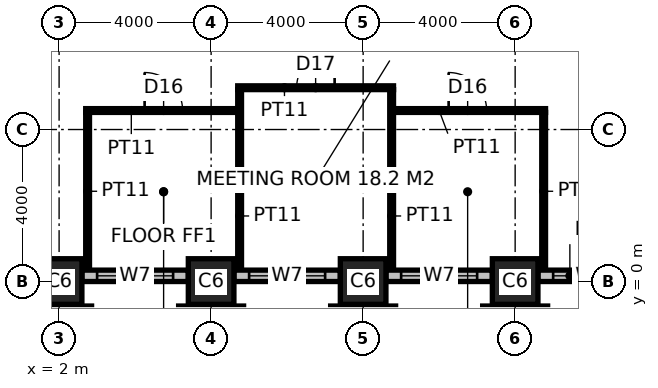
"""IFC4 building model, lengths in metres.
Left out: names, types, materials, properties, quantities, classifications, styles, units other than length and angle.
Written with IfcOpenShell. Run it as: python <this file> out.ifc"""

import sys

from ifc_helpers import new_model, si_unit, direction, frame, frame_2d, origin, origin_2d, place, context, subcontext, project, spatial, rectangle, hollow_rectangle, extrude, element, fill, save


model = new_model("IFC4")
c1 = context("Model", 3, precision=1e-05, world=origin(), true_north=direction((0.0, 1.0)))
c2 = subcontext(c1, "Body", "Model", "MODEL_VIEW")
j1 = project(units=[si_unit("LENGTHUNIT", "METRE"), si_unit("PLANEANGLEUNIT", "RADIAN")], contexts=[c1])
p1 = place(None, origin())
s1 = spatial("IfcSite", under=j1, at=p1, CompositionType="ELEMENT")
p2 = place(p1, origin())
s2 = spatial("IfcBuilding", under=s1, at=p2, CompositionType="ELEMENT")
p3 = place(p2, frame((0.0, 0.0, 67.0)))
s3 = spatial("IfcBuildingStorey", under=s2, at=p3, CompositionType="ELEMENT", Elevation=67.0)
for number, where, z_axis, x_axis in (
    (1, (2.0, 0.0, 0.0), (0.0, 0.0, 1.0), (1.0, 0.0, 0.0)),
    (2, (6.0, 0.0, 0.0), (0.0, 0.0, 1.0), (1.0, 0.0, 0.0)),
    (3, (10.0, 0.0, 0.0), (0.0, 0.0, 1.0), (1.0, 0.0, 0.0)),
    (4, (14.0, 0.0, 0.0), (0.0, 0.0, 1.0), (1.0, 0.0, 0.0)),
):
    element("IfcColumn", number, at=place(p3, frame(where, z_axis=z_axis, x_axis=x_axis)), inside=s3, PredefinedType="COLUMN", context=c2, shape_type="SweptSolid", body=[
        extrude(hollow_rectangle(XDim=1.2, YDim=1.2, WallThickness=0.125, at=origin_2d()), origin(), (0.0, 0.0, 1.0), 4.0),
    ])
p4 = place(p3, frame((2.7, 4.5, 0.0), z_axis=(0.0, 0.0, 1.0), x_axis=(1.0, 0.0, 0.0)))
e5 = element("IfcWall", 5, at=p4, inside=s3, PredefinedType="PARTITIONING", context=c2, shape_type="SweptSolid", body=[
    extrude(rectangle(XDim=4.0, YDim=0.1, at=frame_2d((2.0, 0.0))), origin(), (0.0, 0.0, 1.0), 3.85),
])
p5 = place(p4, frame((1.55, 0.0, 0.0)))
e6 = element("IfcOpeningElement", 6, at=p5, cuts=e5, PredefinedType="OPENING", context=c2, shape_type="SweptSolid", body=[
    extrude(rectangle(XDim=1.0, YDim=2.2, at=frame_2d((0.5, 1.1))), frame((0.0, 0.06, 0.0), z_axis=(0.0, -1.0, 0.0), x_axis=(1.0, 0.0, 0.0)), (0.0, 0.0, 1.0), 0.12),
])
p6 = place(p3, frame((10.8, 4.5, 0.0), z_axis=(0.0, 0.0, 1.0), x_axis=(1.0, 0.0, 0.0)))
e7 = element("IfcWall", 7, at=p6, inside=s3, PredefinedType="PARTITIONING", context=c2, shape_type="SweptSolid", body=[
    extrude(rectangle(XDim=4.0, YDim=0.1, at=frame_2d((2.0, 0.0))), origin(), (0.0, 0.0, 1.0), 3.85),
])
p7 = place(p6, frame((1.45, 0.0, 0.0)))
e8 = element("IfcOpeningElement", 8, at=p7, cuts=e7, PredefinedType="OPENING", context=c2, shape_type="SweptSolid", body=[
    extrude(rectangle(XDim=1.0, YDim=2.2, at=frame_2d((0.5, 1.1))), frame((0.0, 0.06, 0.0), z_axis=(0.0, -1.0, 0.0), x_axis=(1.0, 0.0, 0.0)), (0.0, 0.0, 1.0), 0.12),
])
p8 = place(p3, frame((6.7, 5.1, 0.0), z_axis=(0.0, 0.0, 1.0), x_axis=(1.0, 0.0, 0.0)))
e9 = element("IfcWall", 9, at=p8, inside=s3, PredefinedType="PARTITIONING", context=c2, shape_type="SweptSolid", body=[
    extrude(rectangle(XDim=4.1, YDim=0.1, at=frame_2d((2.05, 0.0))), origin(), (0.0, 0.0, 1.0), 3.85),
])
p9 = place(p8, frame((1.55, 0.0, 0.0)))
e10 = element("IfcOpeningElement", 10, at=p9, cuts=e9, PredefinedType="OPENING", context=c2, shape_type="SweptSolid", body=[
    extrude(rectangle(XDim=1.0, YDim=2.2, at=frame_2d((0.5, 1.1))), frame((0.0, 0.06, 0.0), z_axis=(0.0, -1.0, 0.0), x_axis=(1.0, 0.0, 0.0)), (0.0, 0.0, 1.0), 0.12),
])
p10 = place(p3, frame((2.75, 0.3, 0.0), z_axis=(0.0, 0.0, 1.0), x_axis=(0.0, 1.0, 0.0)))
e11 = element("IfcWall", 11, at=p10, inside=s3, PredefinedType="PARTITIONING", context=c2, shape_type="SweptSolid", body=[
    extrude(rectangle(XDim=4.15, YDim=0.1, at=frame_2d((2.075, 0.0))), origin(), (0.0, 0.0, 1.0), 3.85),
])
for number, where, z_axis, x_axis in (
    (12, (6.75, 0.3, 0.0), (0.0, 0.0, 1.0), (0.0, 1.0, 0.0)),
    (13, (10.75, 0.3, 0.0), (0.0, 0.0, 1.0), (0.0, 1.0, 0.0)),
):
    element("IfcWall", number, at=place(p3, frame(where, z_axis=z_axis, x_axis=x_axis)), inside=s3, PredefinedType="PARTITIONING", context=c2, shape_type="SweptSolid", body=[
        extrude(rectangle(XDim=4.75, YDim=0.1, at=frame_2d((2.375, 0.0))), origin(), (0.0, 0.0, 1.0), 3.85),
    ])
p11 = place(p3, frame((14.75, 0.3, 0.0), z_axis=(0.0, 0.0, 1.0), x_axis=(0.0, 1.0, 0.0)))
e14 = element("IfcWall", 14, at=p11, inside=s3, PredefinedType="PARTITIONING", context=c2, shape_type="SweptSolid", body=[
    extrude(rectangle(XDim=4.15, YDim=0.1, at=frame_2d((2.075, 0.0))), origin(), (0.0, 0.0, 1.0), 3.85),
])
p12 = place(p3, frame((2.6, 0.15, 0.0), z_axis=(0.0, 0.0, 1.0), x_axis=(1.0, 0.0, 0.0)))
e15 = element("IfcWall", 15, at=p12, inside=s3, PredefinedType="ELEMENTEDWALL", context=c2, shape_type="SweptSolid", body=[
    extrude(rectangle(XDim=2.8, YDim=0.3, at=frame_2d((1.4, 0.0))), origin(), (0.0, 0.0, 1.0), 2.65),
])
p13 = place(p12, frame((0.4, 0.0, 0.8)))
e16 = element("IfcOpeningElement", 16, at=p13, cuts=e15, PredefinedType="OPENING", context=c2, shape_type="SweptSolid", body=[
    extrude(rectangle(XDim=2.0, YDim=1.8, at=frame_2d((1.0, 0.9))), frame((0.0, 0.16, 0.0), z_axis=(0.0, -1.0, 0.0), x_axis=(1.0, 0.0, 0.0)), (0.0, 0.0, 1.0), 0.32),
])
p14 = place(p3, frame((6.6, 0.15, 0.0), z_axis=(0.0, 0.0, 1.0), x_axis=(1.0, 0.0, 0.0)))
e17 = element("IfcWall", 17, at=p14, inside=s3, PredefinedType="ELEMENTEDWALL", context=c2, shape_type="SweptSolid", body=[
    extrude(rectangle(XDim=2.8, YDim=0.3, at=frame_2d((1.4, 0.0))), origin(), (0.0, 0.0, 1.0), 2.65),
])
p15 = place(p14, frame((0.4, 0.0, 0.8)))
e18 = element("IfcOpeningElement", 18, at=p15, cuts=e17, PredefinedType="OPENING", context=c2, shape_type="SweptSolid", body=[
    extrude(rectangle(XDim=2.0, YDim=1.8, at=frame_2d((1.0, 0.9))), frame((0.0, 0.16, 0.0), z_axis=(0.0, -1.0, 0.0), x_axis=(1.0, 0.0, 0.0)), (0.0, 0.0, 1.0), 0.32),
])
p16 = place(p3, frame((10.6, 0.15, 0.0), z_axis=(0.0, 0.0, 1.0), x_axis=(1.0, 0.0, 0.0)))
e19 = element("IfcWall", 19, at=p16, inside=s3, PredefinedType="ELEMENTEDWALL", context=c2, shape_type="SweptSolid", body=[
    extrude(rectangle(XDim=2.8, YDim=0.3, at=frame_2d((1.4, 0.0))), origin(), (0.0, 0.0, 1.0), 2.95),
])
p17 = place(p16, frame((0.4, 0.0, 0.8)))
e20 = element("IfcOpeningElement", 20, at=p17, cuts=e19, PredefinedType="OPENING", context=c2, shape_type="SweptSolid", body=[
    extrude(rectangle(XDim=2.0, YDim=1.8, at=frame_2d((1.0, 0.9))), frame((0.0, 0.16, 0.0), z_axis=(0.0, -1.0, 0.0), x_axis=(1.0, 0.0, 0.0)), (0.0, 0.0, 1.0), 0.32),
])
p18 = place(p3, frame((14.6, 0.15, 0.0), z_axis=(0.0, 0.0, 1.0), x_axis=(1.0, 0.0, 0.0)))
e21 = element("IfcWall", 21, at=p18, inside=s3, PredefinedType="ELEMENTEDWALL", context=c2, shape_type="SweptSolid", body=[
    extrude(rectangle(XDim=2.8, YDim=0.3, at=frame_2d((1.4, 0.0))), origin(), (0.0, 0.0, 1.0), 2.95),
])
p19 = place(p18, frame((0.4, 0.0, 0.8)))
e22 = element("IfcOpeningElement", 22, at=p19, cuts=e21, PredefinedType="OPENING", context=c2, shape_type="SweptSolid", body=[
    extrude(rectangle(XDim=2.0, YDim=1.8, at=frame_2d((1.0, 0.9))), frame((0.0, 0.16, 0.0), z_axis=(0.0, -1.0, 0.0), x_axis=(1.0, 0.0, 0.0)), (0.0, 0.0, 1.0), 0.32),
])
p20 = place(p5, origin())
e23 = element("IfcDoor", 23, at=p20, inside=s3, OperationType="SINGLE_SWING_LEFT", PredefinedType="DOOR", context=c2, shape_type="SweptSolid", body=[
    extrude(rectangle(XDim=1.0, YDim=2.2, at=frame_2d((0.5, 1.1))), frame((0.0, 0.025, 0.0), z_axis=(0.0, -1.0, 0.0), x_axis=(1.0, 0.0, 0.0)), (0.0, 0.0, 1.0), 0.05),
])
fill(e6, e23)
p21 = place(p9, origin())
e24 = element("IfcDoor", 24, at=p21, inside=s3, OperationType="SINGLE_SWING_RIGHT", PredefinedType="DOOR", context=c2, shape_type="SweptSolid", body=[
    extrude(rectangle(XDim=1.0, YDim=2.2, at=frame_2d((0.5, 1.1))), frame((0.0, 0.025, 0.0), z_axis=(0.0, -1.0, 0.0), x_axis=(1.0, 0.0, 0.0)), (0.0, 0.0, 1.0), 0.05),
])
fill(e10, e24)
p22 = place(p7, origin())
e25 = element("IfcDoor", 25, at=p22, inside=s3, OperationType="SINGLE_SWING_LEFT", PredefinedType="DOOR", context=c2, shape_type="SweptSolid", body=[
    extrude(rectangle(XDim=1.0, YDim=2.2, at=frame_2d((0.5, 1.1))), frame((0.0, 0.025, 0.0), z_axis=(0.0, -1.0, 0.0), x_axis=(1.0, 0.0, 0.0)), (0.0, 0.0, 1.0), 0.05),
])
fill(e8, e25)
p23 = place(p13, origin())
e26 = element("IfcWindow", 26, at=p23, inside=s3, PartitioningType="SINGLE_PANEL", PredefinedType="WINDOW", context=c2, shape_type="SweptSolid", body=[
    extrude(rectangle(XDim=2.0, YDim=1.8, at=frame_2d((1.0, 0.9))), frame((0.0, 0.03, 0.0), z_axis=(0.0, -1.0, 0.0), x_axis=(1.0, 0.0, 0.0)), (0.0, 0.0, 1.0), 0.06),
])
fill(e16, e26)
p24 = place(p15, origin())
e27 = element("IfcWindow", 27, at=p24, inside=s3, PartitioningType="SINGLE_PANEL", PredefinedType="WINDOW", context=c2, shape_type="SweptSolid", body=[
    extrude(rectangle(XDim=2.0, YDim=1.8, at=frame_2d((1.0, 0.9))), frame((0.0, 0.03, 0.0), z_axis=(0.0, -1.0, 0.0), x_axis=(1.0, 0.0, 0.0)), (0.0, 0.0, 1.0), 0.06),
])
fill(e18, e27)
p25 = place(p17, origin())
e28 = element("IfcWindow", 28, at=p25, inside=s3, PartitioningType="SINGLE_PANEL", PredefinedType="WINDOW", context=c2, shape_type="SweptSolid", body=[
    extrude(rectangle(XDim=2.0, YDim=1.8, at=frame_2d((1.0, 0.9))), frame((0.0, 0.03, 0.0), z_axis=(0.0, -1.0, 0.0), x_axis=(1.0, 0.0, 0.0)), (0.0, 0.0, 1.0), 0.06),
])
fill(e20, e28)
p26 = place(p19, origin())
e29 = element("IfcWindow", 29, at=p26, inside=s3, PartitioningType="SINGLE_PANEL", PredefinedType="WINDOW", context=c2, shape_type="SweptSolid", body=[
    extrude(rectangle(XDim=2.0, YDim=1.8, at=frame_2d((1.0, 0.9))), frame((0.0, 0.03, 0.0), z_axis=(0.0, -1.0, 0.0), x_axis=(1.0, 0.0, 0.0)), (0.0, 0.0, 1.0), 0.06),
])
fill(e22, e29)
save(model, sys.argv[1])
